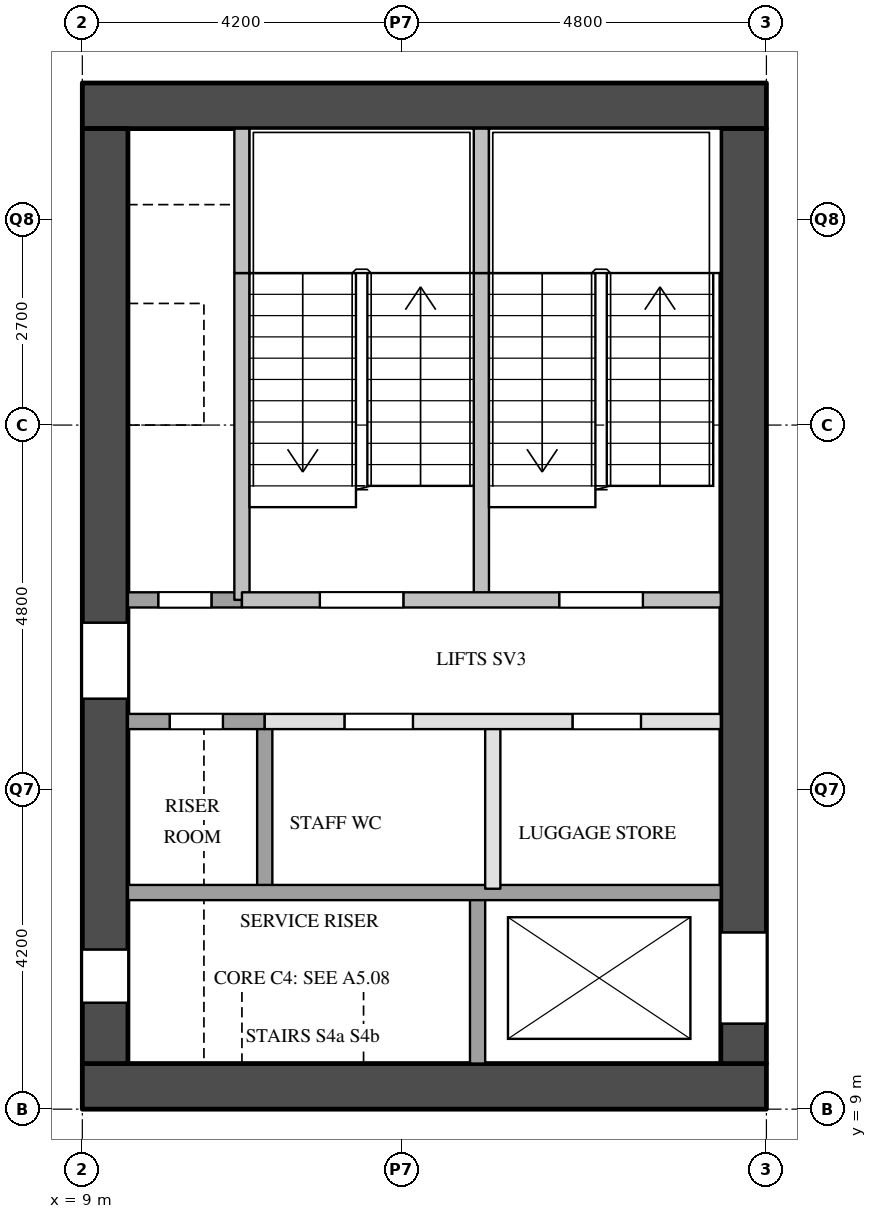
"""IFC4 building model, lengths in metres.
Left out: names, types, materials, properties, quantities, classifications, styles, units other than length and angle.
Written with IfcOpenShell. Run it as: python <this file> out.ifc"""

import sys

from ifc_helpers import new_model, si_unit, direction, frame, frame_2d, origin, place, context, subcontext, project, spatial, rectangle, extrude, element, fill, save


model = new_model("IFC4")
c1 = context("Model", 3, precision=1e-05, world=origin(), true_north=direction((0.0, 1.0)))
c2 = subcontext(c1, "Body", "Model", "MODEL_VIEW")
j1 = project(units=[si_unit("LENGTHUNIT", "METRE"), si_unit("PLANEANGLEUNIT", "RADIAN")], contexts=[c1])
p1 = place(None, origin())
s1 = spatial("IfcSite", under=j1, at=p1, CompositionType="ELEMENT")
p2 = place(p1, origin())
s2 = spatial("IfcBuilding", under=s1, at=p2, CompositionType="ELEMENT")
p3 = place(p2, frame((0.0, 0.0, 38.6)))
s3 = spatial("IfcBuildingStorey", under=s2, at=p3, CompositionType="ELEMENT", Elevation=38.6)
for number, where, z_axis, x_axis in (
    (1, (9.0, 9.3, 0.0), (0.0, 0.0, 1.0), (1.0, 0.0, 0.0)),
    (2, (9.0, 22.2, 0.0), (0.0, 0.0, 1.0), (1.0, 0.0, 0.0)),
):
    element("IfcWall", number, at=place(p3, frame(where, z_axis=z_axis, x_axis=x_axis)), inside=s3, PredefinedType="SHEAR", context=c2, shape_type="SweptSolid", body=[
        extrude(rectangle(XDim=9.0, YDim=0.6, at=frame_2d((4.5, 0.0))), origin(), (0.0, 0.0, 1.0), 3.5),
    ])
p4 = place(p3, frame((9.3, 9.6, 0.0), z_axis=(0.0, 0.0, 1.0), x_axis=(0.0, 1.0, 0.0)))
e3 = element("IfcWall", 3, at=p4, inside=s3, PredefinedType="SHEAR", context=c2, shape_type="SweptSolid", body=[
    extrude(rectangle(XDim=12.3, YDim=0.6, at=frame_2d((6.15, 0.0))), origin(), (0.0, 0.0, 1.0), 3.5),
])
p5 = place(p4, frame((0.8, 0.0, 0.0)))
e4 = element("IfcOpeningElement", 4, at=p5, cuts=e3, PredefinedType="OPENING", context=c2, shape_type="SweptSolid", body=[
    extrude(rectangle(XDim=0.7, YDim=2.1, at=frame_2d((0.35, 1.05))), frame((0.0, 0.31, 0.0), z_axis=(0.0, -1.0, 0.0), x_axis=(1.0, 0.0, 0.0)), (0.0, 0.0, 1.0), 0.62),
])
p6 = place(p4, frame((4.8, 0.0, 0.0)))
e5 = element("IfcOpeningElement", 5, at=p6, cuts=e3, PredefinedType="OPENING", context=c2, shape_type="SweptSolid", body=[
    extrude(rectangle(XDim=1.0, YDim=2.1, at=frame_2d((0.5, 1.05))), frame((0.0, 0.31, 0.0), z_axis=(0.0, -1.0, 0.0), x_axis=(1.0, 0.0, 0.0)), (0.0, 0.0, 1.0), 0.62),
])
p7 = place(p3, frame((17.7, 9.6, 0.0), z_axis=(0.0, 0.0, 1.0), x_axis=(0.0, 1.0, 0.0)))
e6 = element("IfcWall", 6, at=p7, inside=s3, PredefinedType="SHEAR", context=c2, shape_type="SweptSolid", body=[
    extrude(rectangle(XDim=12.3, YDim=0.6, at=frame_2d((6.15, 0.0))), origin(), (0.0, 0.0, 1.0), 3.5),
])
p8 = place(p7, frame((0.525, 0.0, 0.0)))
e7 = element("IfcOpeningElement", 7, at=p8, cuts=e6, PredefinedType="OPENING", context=c2, shape_type="SweptSolid", body=[
    extrude(rectangle(XDim=1.2, YDim=2.1, at=frame_2d((0.6, 1.05))), frame((0.0, 0.31, 0.0), z_axis=(0.0, -1.0, 0.0), x_axis=(1.0, 0.0, 0.0)), (0.0, 0.0, 1.0), 0.62),
])
p9 = place(p3, frame((11.1, 15.7, 0.0), z_axis=(0.0, 0.0, 1.0), x_axis=(0.0, 1.0, 0.0)))
e8 = element("IfcWall", 8, at=p9, inside=s3, PredefinedType="SOLIDWALL", context=c2, shape_type="SweptSolid", body=[
    extrude(rectangle(XDim=4.3, YDim=0.2, at=frame_2d((2.15, 0.0))), origin(), (0.0, 0.0, 1.0), 3.5),
])
p10 = place(p3, frame((11.1, 20.0, 0.0), z_axis=(0.0, 0.0, 1.0), x_axis=(0.0, 1.0, 0.0)))
e9 = element("IfcWall", 9, at=p10, inside=s3, PredefinedType="SOLIDWALL", context=c2, shape_type="SweptSolid", body=[
    extrude(rectangle(XDim=1.9, YDim=0.2, at=frame_2d((0.95, 0.0))), origin(), (0.0, 0.0, 1.0), 3.5),
])
p11 = place(p3, frame((11.4, 11.9, 0.0), z_axis=(0.0, 0.0, 1.0), x_axis=(0.0, 1.0, 0.0)))
e10 = element("IfcWall", 10, at=p11, inside=s3, PredefinedType="SOLIDWALL", context=c2, shape_type="SweptSolid", body=[
    extrude(rectangle(XDim=2.2, YDim=0.2, at=frame_2d((1.1, 0.0))), origin(), (0.0, 0.0, 1.0), 3.5),
])
p12 = place(p3, frame((14.2, 9.6, 0.0), z_axis=(0.0, 0.0, 1.0), x_axis=(0.0, 1.0, 0.0)))
e11 = element("IfcWall", 11, at=p12, inside=s3, PredefinedType="SOLIDWALL", context=c2, shape_type="SweptSolid", body=[
    extrude(rectangle(XDim=2.3, YDim=0.2, at=frame_2d((1.15, 0.0))), origin(), (0.0, 0.0, 1.0), 3.5),
])
p13 = place(p3, frame((14.25, 15.7, 0.0), z_axis=(0.0, 0.0, 1.0), x_axis=(0.0, 1.0, 0.0)))
e12 = element("IfcWall", 12, at=p13, inside=s3, PredefinedType="SOLIDWALL", context=c2, shape_type="SweptSolid", body=[
    extrude(rectangle(XDim=4.3, YDim=0.2, at=frame_2d((2.15, 0.0))), origin(), (0.0, 0.0, 1.0), 3.5),
])
p14 = place(p3, frame((14.25, 20.0, 0.0), z_axis=(0.0, 0.0, 1.0), x_axis=(0.0, 1.0, 0.0)))
e13 = element("IfcWall", 13, at=p14, inside=s3, PredefinedType="SOLIDWALL", context=c2, shape_type="SweptSolid", body=[
    extrude(rectangle(XDim=1.9, YDim=0.2, at=frame_2d((0.95, 0.0))), origin(), (0.0, 0.0, 1.0), 3.5),
])
p15 = place(p3, frame((14.4, 11.9, 0.0), z_axis=(0.0, 0.0, 1.0), x_axis=(0.0, 1.0, 0.0)))
e14 = element("IfcWall", 14, at=p15, inside=s3, PredefinedType="PARTITIONING", context=c2, shape_type="SweptSolid", body=[
    extrude(rectangle(XDim=2.2, YDim=0.2, at=frame_2d((1.1, 0.0))), origin(), (0.0, 0.0, 1.0), 3.5),
])
p16 = place(p3, frame((9.6, 11.85, 0.0), z_axis=(0.0, 0.0, 1.0), x_axis=(1.0, 0.0, 0.0)))
e15 = element("IfcWall", 15, at=p16, inside=s3, PredefinedType="SOLIDWALL", context=c2, shape_type="SweptSolid", body=[
    extrude(rectangle(XDim=7.8, YDim=0.2, at=frame_2d((3.9, 0.0))), origin(), (0.0, 0.0, 1.0), 3.5),
])
p17 = place(p3, frame((11.4, 14.1, 0.0), z_axis=(0.0, 0.0, 1.0), x_axis=(1.0, 0.0, 0.0)))
e16 = element("IfcWall", 16, at=p17, inside=s3, PredefinedType="PARTITIONING", context=c2, shape_type="SweptSolid", body=[
    extrude(rectangle(XDim=6.0, YDim=0.2, at=frame_2d((3.0, 0.0))), origin(), (0.0, 0.0, 1.0), 3.5),
])
p18 = place(p17, frame((1.05, 0.0, 0.0)))
e17 = element("IfcOpeningElement", 17, at=p18, cuts=e16, PredefinedType="OPENING", context=c2, shape_type="SweptSolid", body=[
    extrude(rectangle(XDim=0.9, YDim=2.1, at=frame_2d((0.45, 1.05))), frame((0.0, 0.11, 0.0), z_axis=(0.0, -1.0, 0.0), x_axis=(1.0, 0.0, 0.0)), (0.0, 0.0, 1.0), 0.22),
])
p19 = place(p17, frame((4.05, 0.0, 0.0)))
e18 = element("IfcOpeningElement", 18, at=p19, cuts=e16, PredefinedType="OPENING", context=c2, shape_type="SweptSolid", body=[
    extrude(rectangle(XDim=0.9, YDim=2.1, at=frame_2d((0.45, 1.05))), frame((0.0, 0.11, 0.0), z_axis=(0.0, -1.0, 0.0), x_axis=(1.0, 0.0, 0.0)), (0.0, 0.0, 1.0), 0.22),
])
p20 = place(p3, frame((9.6, 14.1, 0.0), z_axis=(0.0, 0.0, 1.0), x_axis=(1.0, 0.0, 0.0)))
e19 = element("IfcWall", 19, at=p20, inside=s3, PredefinedType="SOLIDWALL", context=c2, shape_type="SweptSolid", body=[
    extrude(rectangle(XDim=1.8, YDim=0.2, at=frame_2d((0.9, 0.0))), origin(), (0.0, 0.0, 1.0), 3.5),
])
p21 = place(p20, frame((0.55, 0.0, 0.0)))
e20 = element("IfcOpeningElement", 20, at=p21, cuts=e19, PredefinedType="OPENING", context=c2, shape_type="SweptSolid", body=[
    extrude(rectangle(XDim=0.7, YDim=2.1, at=frame_2d((0.35, 1.05))), frame((0.0, 0.11, 0.0), z_axis=(0.0, -1.0, 0.0), x_axis=(1.0, 0.0, 0.0)), (0.0, 0.0, 1.0), 0.22),
])
p22 = place(p3, frame((9.6, 15.7, 0.0), z_axis=(0.0, 0.0, 1.0), x_axis=(1.0, 0.0, 0.0)))
e21 = element("IfcWall", 21, at=p22, inside=s3, PredefinedType="SOLIDWALL", context=c2, shape_type="SweptSolid", body=[
    extrude(rectangle(XDim=1.5, YDim=0.2, at=frame_2d((0.75, 0.0))), origin(), (0.0, 0.0, 1.0), 3.5),
])
p23 = place(p22, frame((0.4, 0.0, 0.0)))
e22 = element("IfcOpeningElement", 22, at=p23, cuts=e21, PredefinedType="OPENING", context=c2, shape_type="SweptSolid", body=[
    extrude(rectangle(XDim=0.7, YDim=2.1, at=frame_2d((0.35, 1.05))), frame((0.0, 0.11, 0.0), z_axis=(0.0, -1.0, 0.0), x_axis=(1.0, 0.0, 0.0)), (0.0, 0.0, 1.0), 0.22),
])
p24 = place(p3, frame((11.1, 15.7, 0.0), z_axis=(0.0, 0.0, 1.0), x_axis=(1.0, 0.0, 0.0)))
e23 = element("IfcWall", 23, at=p24, inside=s3, PredefinedType="SOLIDWALL", context=c2, shape_type="SweptSolid", body=[
    extrude(rectangle(XDim=6.3, YDim=0.2, at=frame_2d((3.15, 0.0))), origin(), (0.0, 0.0, 1.0), 3.5),
])
p25 = place(p24, frame((4.175, 0.0, 0.0)))
e24 = element("IfcOpeningElement", 24, at=p25, cuts=e23, PredefinedType="OPENING", context=c2, shape_type="SweptSolid", body=[
    extrude(rectangle(XDim=1.1, YDim=2.1, at=frame_2d((0.55, 1.05))), frame((0.0, 0.11, 0.0), z_axis=(0.0, -1.0, 0.0), x_axis=(1.0, 0.0, 0.0)), (0.0, 0.0, 1.0), 0.22),
])
p26 = place(p24, frame((1.025, 0.0, 0.0)))
e25 = element("IfcOpeningElement", 25, at=p26, cuts=e23, PredefinedType="OPENING", context=c2, shape_type="SweptSolid", body=[
    extrude(rectangle(XDim=1.1, YDim=2.1, at=frame_2d((0.55, 1.05))), frame((0.0, 0.11, 0.0), z_axis=(0.0, -1.0, 0.0), x_axis=(1.0, 0.0, 0.0)), (0.0, 0.0, 1.0), 0.22),
])
p27 = place(p8, origin())
e26 = element("IfcDoor", 26, at=p27, inside=s3, OperationType="SLIDING_TO_LEFT", PredefinedType="DOOR", context=c2, shape_type="SweptSolid", body=[
    extrude(rectangle(XDim=1.2, YDim=2.1, at=frame_2d((0.6, 1.05))), frame((0.0, 0.025, 0.0), z_axis=(0.0, -1.0, 0.0), x_axis=(1.0, 0.0, 0.0)), (0.0, 0.0, 1.0), 0.05),
])
fill(e7, e26)
p28 = place(p25, origin())
e27 = element("IfcDoor", 27, at=p28, inside=s3, OperationType="SINGLE_SWING_RIGHT", PredefinedType="DOOR", context=c2, shape_type="SweptSolid", body=[
    extrude(rectangle(XDim=1.1, YDim=2.1, at=frame_2d((0.55, 1.05))), frame((0.0, 0.025, 0.0), z_axis=(0.0, -1.0, 0.0), x_axis=(1.0, 0.0, 0.0)), (0.0, 0.0, 1.0), 0.05),
])
fill(e24, e27)
p29 = place(p26, origin())
e28 = element("IfcDoor", 28, at=p29, inside=s3, OperationType="SINGLE_SWING_LEFT", PredefinedType="DOOR", context=c2, shape_type="SweptSolid", body=[
    extrude(rectangle(XDim=1.1, YDim=2.1, at=frame_2d((0.55, 1.05))), frame((0.0, 0.025, 0.0), z_axis=(0.0, -1.0, 0.0), x_axis=(1.0, 0.0, 0.0)), (0.0, 0.0, 1.0), 0.05),
])
fill(e25, e28)
p30 = place(p23, origin())
e29 = element("IfcDoor", 29, at=p30, inside=s3, OperationType="SINGLE_SWING_LEFT", PredefinedType="DOOR", context=c2, shape_type="SweptSolid", body=[
    extrude(rectangle(XDim=0.7, YDim=2.1, at=frame_2d((0.35, 1.05))), frame((0.0, 0.025, 0.0), z_axis=(0.0, -1.0, 0.0), x_axis=(1.0, 0.0, 0.0)), (0.0, 0.0, 1.0), 0.05),
])
fill(e22, e29)
p31 = place(p21, origin())
e30 = element("IfcDoor", 30, at=p31, inside=s3, OperationType="SINGLE_SWING_LEFT", PredefinedType="DOOR", context=c2, shape_type="SweptSolid", body=[
    extrude(rectangle(XDim=0.7, YDim=2.1, at=frame_2d((0.35, 1.05))), frame((0.0, 0.025, 0.0), z_axis=(0.0, -1.0, 0.0), x_axis=(1.0, 0.0, 0.0)), (0.0, 0.0, 1.0), 0.05),
])
fill(e20, e30)
p32 = place(p5, origin())
e31 = element("IfcDoor", 31, at=p32, inside=s3, OperationType="SINGLE_SWING_LEFT", PredefinedType="DOOR", context=c2, shape_type="SweptSolid", body=[
    extrude(rectangle(XDim=0.7, YDim=2.1, at=frame_2d((0.35, 1.05))), frame((0.0, 0.025, 0.0), z_axis=(0.0, -1.0, 0.0), x_axis=(1.0, 0.0, 0.0)), (0.0, 0.0, 1.0), 0.05),
])
fill(e4, e31)
p33 = place(p6, origin())
e32 = element("IfcDoor", 32, at=p33, inside=s3, OperationType="SINGLE_SWING_LEFT", PredefinedType="DOOR", context=c2, shape_type="SweptSolid", body=[
    extrude(rectangle(XDim=1.0, YDim=2.1, at=frame_2d((0.5, 1.05))), frame((0.0, 0.025, 0.0), z_axis=(0.0, -1.0, 0.0), x_axis=(1.0, 0.0, 0.0)), (0.0, 0.0, 1.0), 0.05),
])
fill(e5, e32)
p34 = place(p18, origin())
e33 = element("IfcDoor", 33, at=p34, inside=s3, OperationType="SINGLE_SWING_LEFT", PredefinedType="DOOR", context=c2, shape_type="SweptSolid", body=[
    extrude(rectangle(XDim=0.9, YDim=2.1, at=frame_2d((0.45, 1.05))), frame((0.0, 0.025, 0.0), z_axis=(0.0, -1.0, 0.0), x_axis=(1.0, 0.0, 0.0)), (0.0, 0.0, 1.0), 0.05),
])
fill(e17, e33)
p35 = place(p19, origin())
e34 = element("IfcDoor", 34, at=p35, inside=s3, OperationType="SINGLE_SWING_RIGHT", PredefinedType="DOOR", context=c2, shape_type="SweptSolid", body=[
    extrude(rectangle(XDim=0.9, YDim=2.1, at=frame_2d((0.45, 1.05))), frame((0.0, 0.025, 0.0), z_axis=(0.0, -1.0, 0.0), x_axis=(1.0, 0.0, 0.0)), (0.0, 0.0, 1.0), 0.05),
])
fill(e18, e34)
save(model, sys.argv[1])
